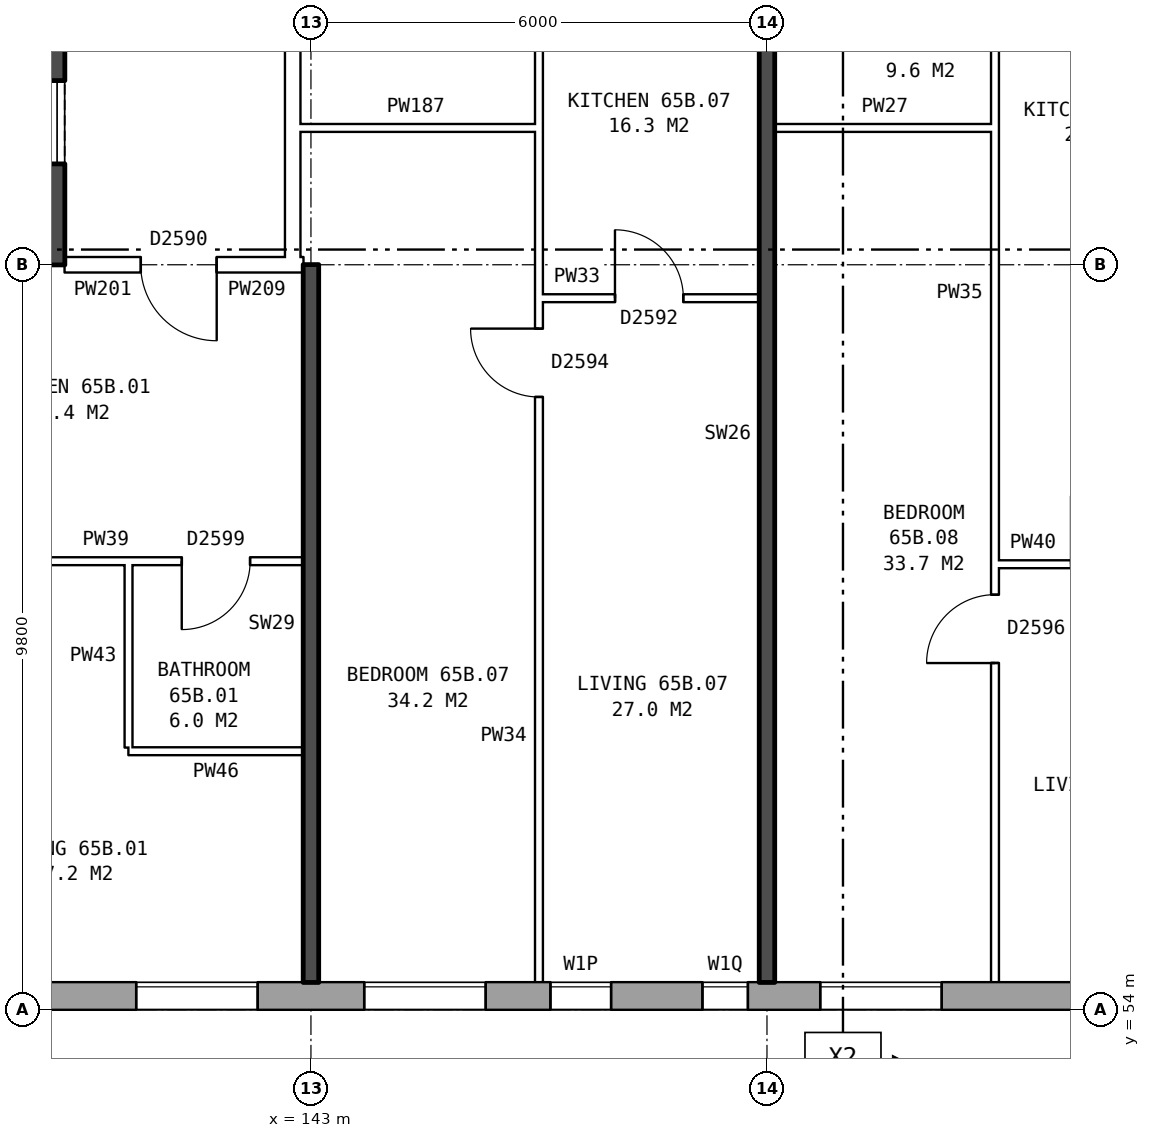
"""IFC4 building model, lengths in metres.
Left out: names, types, materials, properties, quantities, classifications, styles, units other than length and angle.
Written with IfcOpenShell. Run it as: python <this file> out.ifc"""

import sys

from ifc_helpers import new_model, si_unit, direction, frame, frame_2d, origin, place, context, subcontext, project, spatial, rectangle, extrude, element, fill, save


model = new_model("IFC4")
c1 = context("Model", 3, precision=1e-05, world=origin(), true_north=direction((0.0, 1.0)))
c2 = subcontext(c1, "Body", "Model", "MODEL_VIEW")
j1 = project(units=[si_unit("LENGTHUNIT", "METRE"), si_unit("PLANEANGLEUNIT", "RADIAN")], contexts=[c1])
p1 = place(None, origin())
s1 = spatial("IfcSite", under=j1, at=p1, CompositionType="ELEMENT")
p2 = place(p1, origin())
s2 = spatial("IfcBuilding", under=s1, at=p2, CompositionType="ELEMENT")
p3 = place(p2, frame((0.0, 0.0, 230.7)))
s3 = spatial("IfcBuildingStorey", under=s2, at=p3, CompositionType="ELEMENT", Elevation=230.7)
p4 = place(p3, frame((132.05, 54.18, 0.0), z_axis=(0.0, 0.0, 1.0), x_axis=(1.0, 0.0, 0.0)))
e1 = element("IfcWall", 1, at=p4, inside=s3, PredefinedType="STANDARD", context=c2, shape_type="SweptSolid", body=[
    extrude(rectangle(XDim=33.875, YDim=0.36, at=frame_2d((16.938, 0.0))), origin(), (0.0, 0.0, 1.0), 2.85),
])
p5 = place(p4, frame((2.65, 0.0, 0.8)))
e2 = element("IfcOpeningElement", 2, at=p5, cuts=e1, PredefinedType="OPENING", context=c2, shape_type="SweptSolid", body=[
    extrude(rectangle(XDim=1.6, YDim=1.8, at=frame_2d((0.8, 0.9))), frame((0.0, 0.19, 0.0), z_axis=(0.0, -1.0, 0.0), x_axis=(1.0, 0.0, 0.0)), (0.0, 0.0, 1.0), 0.38),
])
p6 = place(p4, frame((5.65, 0.0, 0.8)))
e3 = element("IfcOpeningElement", 3, at=p6, cuts=e1, PredefinedType="OPENING", context=c2, shape_type="SweptSolid", body=[
    extrude(rectangle(XDim=1.6, YDim=1.8, at=frame_2d((0.8, 0.9))), frame((0.0, 0.19, 0.0), z_axis=(0.0, -1.0, 0.0), x_axis=(1.0, 0.0, 0.0)), (0.0, 0.0, 1.0), 0.38),
])
p7 = place(p4, frame((8.65, 0.0, 0.8)))
e4 = element("IfcOpeningElement", 4, at=p7, cuts=e1, PredefinedType="OPENING", context=c2, shape_type="SweptSolid", body=[
    extrude(rectangle(XDim=1.6, YDim=1.8, at=frame_2d((0.8, 0.9))), frame((0.0, 0.19, 0.0), z_axis=(0.0, -1.0, 0.0), x_axis=(1.0, 0.0, 0.0)), (0.0, 0.0, 1.0), 0.38),
])
p8 = place(p4, frame((11.65, 0.0, 0.8)))
e5 = element("IfcOpeningElement", 5, at=p8, cuts=e1, PredefinedType="OPENING", context=c2, shape_type="SweptSolid", body=[
    extrude(rectangle(XDim=1.6, YDim=1.8, at=frame_2d((0.8, 0.9))), frame((0.0, 0.19, 0.0), z_axis=(0.0, -1.0, 0.0), x_axis=(1.0, 0.0, 0.0)), (0.0, 0.0, 1.0), 0.38),
])
p9 = place(p4, frame((14.1, 0.0, 1.25)))
e6 = element("IfcOpeningElement", 6, at=p9, cuts=e1, PredefinedType="OPENING", context=c2, shape_type="SweptSolid", body=[
    extrude(rectangle(XDim=0.8, YDim=1.2, at=frame_2d((0.4, 0.6))), frame((0.0, 0.19, 0.0), z_axis=(0.0, -1.0, 0.0), x_axis=(1.0, 0.0, 0.0)), (0.0, 0.0, 1.0), 0.38),
])
p10 = place(p4, frame((17.65, 0.0, 0.8)))
e7 = element("IfcOpeningElement", 7, at=p10, cuts=e1, PredefinedType="OPENING", context=c2, shape_type="SweptSolid", body=[
    extrude(rectangle(XDim=1.6, YDim=1.8, at=frame_2d((0.8, 0.9))), frame((0.0, 0.19, 0.0), z_axis=(0.0, -1.0, 0.0), x_axis=(1.0, 0.0, 0.0)), (0.0, 0.0, 1.0), 0.38),
])
p11 = place(p4, frame((21.25, 0.0, 0.8)))
e8 = element("IfcOpeningElement", 8, at=p11, cuts=e1, PredefinedType="OPENING", context=c2, shape_type="SweptSolid", body=[
    extrude(rectangle(XDim=1.4, YDim=1.8, at=frame_2d((0.7, 0.9))), frame((0.0, 0.19, 0.0), z_axis=(0.0, -1.0, 0.0), x_axis=(1.0, 0.0, 0.0)), (0.0, 0.0, 1.0), 0.38),
])
p12 = place(p4, frame((23.65, 0.0, 0.8)))
e9 = element("IfcOpeningElement", 9, at=p12, cuts=e1, PredefinedType="OPENING", context=c2, shape_type="SweptSolid", body=[
    extrude(rectangle(XDim=1.6, YDim=1.8, at=frame_2d((0.8, 0.9))), frame((0.0, 0.19, 0.0), z_axis=(0.0, -1.0, 0.0), x_axis=(1.0, 0.0, 0.0)), (0.0, 0.0, 1.0), 0.38),
])
p13 = place(p4, frame((26.65, 0.0, 0.8)))
e10 = element("IfcOpeningElement", 10, at=p13, cuts=e1, PredefinedType="OPENING", context=c2, shape_type="SweptSolid", body=[
    extrude(rectangle(XDim=1.6, YDim=1.8, at=frame_2d((0.8, 0.9))), frame((0.0, 0.19, 0.0), z_axis=(0.0, -1.0, 0.0), x_axis=(1.0, 0.0, 0.0)), (0.0, 0.0, 1.0), 0.38),
])
p14 = place(p4, frame((29.65, 0.0, 0.8)))
e11 = element("IfcOpeningElement", 11, at=p14, cuts=e1, PredefinedType="OPENING", context=c2, shape_type="SweptSolid", body=[
    extrude(rectangle(XDim=1.6, YDim=1.8, at=frame_2d((0.8, 0.9))), frame((0.0, 0.19, 0.0), z_axis=(0.0, -1.0, 0.0), x_axis=(1.0, 0.0, 0.0)), (0.0, 0.0, 1.0), 0.38),
])
p15 = place(p4, frame((16.1, 0.0, 0.15)))
e12 = element("IfcOpeningElement", 12, at=p15, cuts=e1, PredefinedType="OPENING", context=c2, shape_type="SweptSolid", body=[
    extrude(rectangle(XDim=0.6, YDim=1.2, at=frame_2d((0.3, 0.6))), frame((0.0, 0.19, 0.0), z_axis=(0.0, -1.0, 0.0), x_axis=(1.0, 0.0, 0.0)), (0.0, 0.0, 1.0), 0.38),
])
p16 = place(p3, frame((139.56, 63.8, 0.0), z_axis=(0.0, 0.0, 1.0), x_axis=(0.0, 1.0, 0.0)))
e13 = element("IfcWall", 13, at=p16, inside=s3, PredefinedType="SHEAR", context=c2, shape_type="SweptSolid", body=[
    extrude(rectangle(XDim=12.4, YDim=0.4, at=frame_2d((6.2, 0.0))), origin(), (0.0, 0.0, 1.0), 2.85),
])
p17 = place(p16, frame((1.325, 0.0, 0.0)))
e14 = element("IfcOpeningElement", 14, at=p17, cuts=e13, PredefinedType="OPENING", context=c2, shape_type="SweptSolid", body=[
    extrude(rectangle(XDim=1.1, YDim=2.1, at=frame_2d((0.55, 1.05))), frame((0.0, 0.21, 0.0), z_axis=(0.0, -1.0, 0.0), x_axis=(1.0, 0.0, 0.0)), (0.0, 0.0, 1.0), 0.42),
])
p18 = place(p16, frame((3.6, 0.0, 0.0)))
e15 = element("IfcOpeningElement", 15, at=p18, cuts=e13, PredefinedType="OPENING", context=c2, shape_type="SweptSolid", body=[
    extrude(rectangle(XDim=1.1, YDim=2.1, at=frame_2d((0.55, 1.05))), frame((0.0, 0.21, 0.0), z_axis=(0.0, -1.0, 0.0), x_axis=(1.0, 0.0, 0.0)), (0.0, 0.0, 1.0), 0.42),
])
p19 = place(p16, frame((5.8, 0.0, 0.0)))
e16 = element("IfcOpeningElement", 16, at=p19, cuts=e13, PredefinedType="OPENING", context=c2, shape_type="SweptSolid", body=[
    extrude(rectangle(XDim=1.1, YDim=2.1, at=frame_2d((0.55, 1.05))), frame((0.0, 0.21, 0.0), z_axis=(0.0, -1.0, 0.0), x_axis=(1.0, 0.0, 0.0)), (0.0, 0.0, 1.0), 0.42),
])
p20 = place(p16, frame((9.9, 0.0, 0.0)))
e17 = element("IfcOpeningElement", 17, at=p20, cuts=e13, PredefinedType="OPENING", context=c2, shape_type="SweptSolid", body=[
    extrude(rectangle(XDim=1.1, YDim=2.1, at=frame_2d((0.55, 1.05))), frame((0.0, 0.21, 0.0), z_axis=(0.0, -1.0, 0.0), x_axis=(1.0, 0.0, 0.0)), (0.0, 0.0, 1.0), 0.42),
])
p21 = place(p16, frame((8.125, 0.0, 0.0)))
e18 = element("IfcOpeningElement", 18, at=p21, cuts=e13, PredefinedType="OPENING", context=c2, shape_type="SweptSolid", body=[
    extrude(rectangle(XDim=0.85, YDim=2.1, at=frame_2d((0.425, 1.05))), frame((0.0, 0.21, 0.0), z_axis=(0.0, -1.0, 0.0), x_axis=(1.0, 0.0, 0.0)), (0.0, 0.0, 1.0), 0.42),
])
p22 = place(p3, frame((142.76, 63.9, 0.0), z_axis=(0.0, 0.0, 1.0), x_axis=(0.0, 1.0, 0.0)))
e19 = element("IfcWall", 19, at=p22, inside=s3, PredefinedType="PARTITIONING", context=c2, shape_type="SweptSolid", body=[
    extrude(rectangle(XDim=12.2, YDim=0.2, at=frame_2d((6.1, 0.0))), origin(), (0.0, 0.0, 1.0), 2.85),
])
p23 = place(p22, frame((5.1, 0.0, 0.0)))
e20 = element("IfcOpeningElement", 20, at=p23, cuts=e19, PredefinedType="OPENING", context=c2, shape_type="SweptSolid", body=[
    extrude(rectangle(XDim=2.0, YDim=2.1, at=frame_2d((1.0, 1.05))), frame((0.0, 0.11, 0.0), z_axis=(0.0, -1.0, 0.0), x_axis=(1.0, 0.0, 0.0)), (0.0, 0.0, 1.0), 0.22),
])
p24 = place(p3, frame((140.6, 57.4, 0.0), z_axis=(0.0, 0.0, 1.0), x_axis=(1.0, 0.0, 0.0)))
e21 = element("IfcWall", 21, at=p24, inside=s3, PredefinedType="PARTITIONING", context=c2, shape_type="SweptSolid", body=[
    extrude(rectangle(XDim=2.3, YDim=0.1, at=frame_2d((1.15, 0.0))), origin(), (0.0, 0.0, 1.0), 2.85),
])
p25 = place(p3, frame((152.0, 59.86, 0.0), z_axis=(0.0, 0.0, 1.0), x_axis=(1.0, 0.0, 0.0)))
e22 = element("IfcWall", 22, at=p25, inside=s3, PredefinedType="PARTITIONING", context=c2, shape_type="SweptSolid", body=[
    extrude(rectangle(XDim=2.9, YDim=0.1, at=frame_2d((1.45, 0.0))), origin(), (0.0, 0.0, 1.0), 2.85),
])
p26 = place(p25, frame((1.0, 0.0, 0.0)))
e23 = element("IfcOpeningElement", 23, at=p26, cuts=e22, PredefinedType="OPENING", context=c2, shape_type="SweptSolid", body=[
    extrude(rectangle(XDim=0.9, YDim=2.1, at=frame_2d((0.45, 1.05))), frame((0.0, 0.06, 0.0), z_axis=(0.0, -1.0, 0.0), x_axis=(1.0, 0.0, 0.0)), (0.0, 0.0, 1.0), 0.12),
])
p27 = place(p3, frame((137.1, 59.9, 0.0), z_axis=(0.0, 0.0, 1.0), x_axis=(1.0, 0.0, 0.0)))
e24 = element("IfcWall", 24, at=p27, inside=s3, PredefinedType="PARTITIONING", context=c2, shape_type="SweptSolid", body=[
    extrude(rectangle(XDim=5.8, YDim=0.1, at=frame_2d((2.9, 0.0))), origin(), (0.0, 0.0, 1.0), 2.85),
])
p28 = place(p27, frame((1.3, 0.0, 0.0)))
e25 = element("IfcOpeningElement", 25, at=p28, cuts=e24, PredefinedType="OPENING", context=c2, shape_type="SweptSolid", body=[
    extrude(rectangle(XDim=0.9, YDim=2.1, at=frame_2d((0.45, 1.05))), frame((0.0, 0.06, 0.0), z_axis=(0.0, -1.0, 0.0), x_axis=(1.0, 0.0, 0.0)), (0.0, 0.0, 1.0), 0.12),
])
p29 = place(p27, frame((4.2, 0.0, 0.0)))
e26 = element("IfcOpeningElement", 26, at=p29, cuts=e24, PredefinedType="OPENING", context=c2, shape_type="SweptSolid", body=[
    extrude(rectangle(XDim=0.9, YDim=2.1, at=frame_2d((0.45, 1.05))), frame((0.0, 0.06, 0.0), z_axis=(0.0, -1.0, 0.0), x_axis=(1.0, 0.0, 0.0)), (0.0, 0.0, 1.0), 0.12),
])
p30 = place(p3, frame((146.0, 63.36, 0.0), z_axis=(0.0, 0.0, 1.0), x_axis=(1.0, 0.0, 0.0)))
e27 = element("IfcWall", 27, at=p30, inside=s3, PredefinedType="PARTITIONING", context=c2, shape_type="SweptSolid", body=[
    extrude(rectangle(XDim=2.9, YDim=0.1, at=frame_2d((1.45, 0.0))), origin(), (0.0, 0.0, 1.0), 2.85),
])
p31 = place(p30, frame((1.0, 0.0, 0.0)))
e28 = element("IfcOpeningElement", 28, at=p31, cuts=e27, PredefinedType="OPENING", context=c2, shape_type="SweptSolid", body=[
    extrude(rectangle(XDim=0.9, YDim=2.1, at=frame_2d((0.45, 1.05))), frame((0.0, 0.06, 0.0), z_axis=(0.0, -1.0, 0.0), x_axis=(1.0, 0.0, 0.0)), (0.0, 0.0, 1.0), 0.12),
])
p32 = place(p3, frame((139.76, 63.8, 0.0), z_axis=(0.0, 0.0, 1.0), x_axis=(1.0, 0.0, 0.0)))
e29 = element("IfcWall", 29, at=p32, inside=s3, PredefinedType="PARTITIONING", context=c2, shape_type="SweptSolid", body=[
    extrude(rectangle(XDim=3.0, YDim=0.2, at=frame_2d((1.5, 0.0))), origin(), (0.0, 0.0, 1.0), 2.85),
])
p33 = place(p32, frame((1.0, 0.0, 0.0)))
e30 = element("IfcOpeningElement", 30, at=p33, cuts=e29, PredefinedType="OPENING", context=c2, shape_type="SweptSolid", body=[
    extrude(rectangle(XDim=1.0, YDim=2.1, at=frame_2d((0.5, 1.05))), frame((0.0, 0.11, 0.0), z_axis=(0.0, -1.0, 0.0), x_axis=(1.0, 0.0, 0.0)), (0.0, 0.0, 1.0), 0.22),
])
p34 = place(p3, frame((142.76, 63.8, 0.0), z_axis=(0.0, 0.0, 1.0), x_axis=(1.0, 0.0, 0.0)))
e31 = element("IfcWall", 31, at=p34, inside=s3, PredefinedType="PARTITIONING", context=c2, shape_type="SweptSolid", body=[
    extrude(rectangle(XDim=0.14, YDim=0.2, at=frame_2d((0.07, 0.0))), origin(), (0.0, 0.0, 1.0), 2.85),
])
p35 = place(p3, frame((142.76, 65.6, 0.0), z_axis=(0.0, 0.0, 1.0), x_axis=(1.0, 0.0, 0.0)))
e32 = element("IfcWall", 32, at=p35, inside=s3, PredefinedType="PARTITIONING", context=c2, shape_type="SweptSolid", body=[
    extrude(rectangle(XDim=3.24, YDim=0.1, at=frame_2d((1.62, 0.0))), origin(), (0.0, 0.0, 1.0), 2.85),
])
p36 = place(p3, frame((149.1, 65.6, 0.0), z_axis=(0.0, 0.0, 1.0), x_axis=(1.0, 0.0, 0.0)))
e33 = element("IfcWall", 33, at=p36, inside=s3, PredefinedType="PARTITIONING", context=c2, shape_type="SweptSolid", body=[
    extrude(rectangle(XDim=2.9, YDim=0.1, at=frame_2d((1.45, 0.0))), origin(), (0.0, 0.0, 1.0), 2.85),
])
p37 = place(p3, frame((140.6, 57.45, 0.0), z_axis=(0.0, 0.0, 1.0), x_axis=(0.0, 1.0, 0.0)))
e34 = element("IfcWall", 34, at=p37, inside=s3, PredefinedType="PARTITIONING", context=c2, shape_type="SweptSolid", body=[
    extrude(rectangle(XDim=2.4, YDim=0.1, at=frame_2d((1.2, 0.0))), origin(), (0.0, 0.0, 1.0), 2.85),
])
p38 = place(p3, frame((143.0, 54.36, 0.0), z_axis=(0.0, 0.0, 1.0), x_axis=(0.0, 1.0, 0.0)))
e35 = element("IfcWall", 35, at=p38, inside=s3, PredefinedType="SOLIDWALL", context=c2, shape_type="SweptSolid", body=[
    extrude(rectangle(XDim=9.44, YDim=0.2, at=frame_2d((4.72, 0.0))), origin(), (0.0, 0.0, 1.0), 2.85),
])
p39 = place(p3, frame((146.0, 54.36, 0.0), z_axis=(0.0, 0.0, 1.0), x_axis=(0.0, 1.0, 0.0)))
e36 = element("IfcWall", 36, at=p39, inside=s3, PredefinedType="PARTITIONING", context=c2, shape_type="SweptSolid", body=[
    extrude(rectangle(XDim=14.34, YDim=0.1, at=frame_2d((7.17, 0.0))), origin(), (0.0, 0.0, 1.0), 2.85),
])
p40 = place(p39, frame((7.7, 0.0, 0.0)))
e37 = element("IfcOpeningElement", 37, at=p40, cuts=e36, PredefinedType="OPENING", context=c2, shape_type="SweptSolid", body=[
    extrude(rectangle(XDim=0.9, YDim=2.1, at=frame_2d((0.45, 1.05))), frame((0.0, 0.06, 0.0), z_axis=(0.0, -1.0, 0.0), x_axis=(1.0, 0.0, 0.0)), (0.0, 0.0, 1.0), 0.12),
])
p41 = place(p39, frame((13.04, 0.0, 0.0)))
e38 = element("IfcOpeningElement", 38, at=p41, cuts=e36, PredefinedType="OPENING", context=c2, shape_type="SweptSolid", body=[
    extrude(rectangle(XDim=0.9, YDim=2.1, at=frame_2d((0.45, 1.05))), frame((0.0, 0.06, 0.0), z_axis=(0.0, -1.0, 0.0), x_axis=(1.0, 0.0, 0.0)), (0.0, 0.0, 1.0), 0.12),
])
p42 = place(p3, frame((149.0, 54.36, 0.0), z_axis=(0.0, 0.0, 1.0), x_axis=(0.0, 1.0, 0.0)))
e39 = element("IfcWall", 39, at=p42, inside=s3, PredefinedType="SOLIDWALL", context=c2, shape_type="SweptSolid", body=[
    extrude(rectangle(XDim=14.44, YDim=0.2, at=frame_2d((7.22, 0.0))), origin(), (0.0, 0.0, 1.0), 2.85),
])
p43 = place(p3, frame((152.0, 54.36, 0.0), z_axis=(0.0, 0.0, 1.0), x_axis=(0.0, 1.0, 0.0)))
e40 = element("IfcWall", 40, at=p43, inside=s3, PredefinedType="PARTITIONING", context=c2, shape_type="SweptSolid", body=[
    extrude(rectangle(XDim=14.34, YDim=0.1, at=frame_2d((7.17, 0.0))), origin(), (0.0, 0.0, 1.0), 2.85),
])
p44 = place(p43, frame((4.2, 0.0, 0.0)))
e41 = element("IfcOpeningElement", 41, at=p44, cuts=e40, PredefinedType="OPENING", context=c2, shape_type="SweptSolid", body=[
    extrude(rectangle(XDim=0.9, YDim=2.1, at=frame_2d((0.45, 1.05))), frame((0.0, 0.06, 0.0), z_axis=(0.0, -1.0, 0.0), x_axis=(1.0, 0.0, 0.0)), (0.0, 0.0, 1.0), 0.12),
])
p45 = place(p43, frame((13.04, 0.0, 0.0)))
e42 = element("IfcOpeningElement", 42, at=p45, cuts=e40, PredefinedType="OPENING", context=c2, shape_type="SweptSolid", body=[
    extrude(rectangle(XDim=0.9, YDim=2.1, at=frame_2d((0.45, 1.05))), frame((0.0, 0.06, 0.0), z_axis=(0.0, -1.0, 0.0), x_axis=(1.0, 0.0, 0.0)), (0.0, 0.0, 1.0), 0.12),
])
p46 = place(p7, origin())
e43 = element("IfcWindow", 43, at=p46, inside=s3, PartitioningType="SINGLE_PANEL", PredefinedType="WINDOW", context=c2, shape_type="SweptSolid", body=[
    extrude(rectangle(XDim=1.6, YDim=1.8, at=frame_2d((0.8, 0.9))), frame((0.0, 0.15, 0.0), z_axis=(0.0, -1.0, 0.0), x_axis=(1.0, 0.0, 0.0)), (0.0, 0.0, 1.0), 0.06),
])
fill(e4, e43)
p47 = place(p8, origin())
e44 = element("IfcWindow", 44, at=p47, inside=s3, PartitioningType="SINGLE_PANEL", PredefinedType="WINDOW", context=c2, shape_type="SweptSolid", body=[
    extrude(rectangle(XDim=1.6, YDim=1.8, at=frame_2d((0.8, 0.9))), frame((0.0, 0.15, 0.0), z_axis=(0.0, -1.0, 0.0), x_axis=(1.0, 0.0, 0.0)), (0.0, 0.0, 1.0), 0.06),
])
fill(e5, e44)
p48 = place(p9, origin())
e45 = element("IfcWindow", 45, at=p48, inside=s3, PartitioningType="SINGLE_PANEL", PredefinedType="WINDOW", context=c2, shape_type="SweptSolid", body=[
    extrude(rectangle(XDim=0.8, YDim=1.2, at=frame_2d((0.4, 0.6))), frame((0.0, 0.15, 0.0), z_axis=(0.0, -1.0, 0.0), x_axis=(1.0, 0.0, 0.0)), (0.0, 0.0, 1.0), 0.06),
])
fill(e6, e45)
p49 = place(p10, origin())
e46 = element("IfcWindow", 46, at=p49, inside=s3, PartitioningType="SINGLE_PANEL", PredefinedType="WINDOW", context=c2, shape_type="SweptSolid", body=[
    extrude(rectangle(XDim=1.6, YDim=1.8, at=frame_2d((0.8, 0.9))), frame((0.0, 0.15, 0.0), z_axis=(0.0, -1.0, 0.0), x_axis=(1.0, 0.0, 0.0)), (0.0, 0.0, 1.0), 0.06),
])
fill(e7, e46)
p50 = place(p33, frame((1.0, 0.0, 0.0), z_axis=(0.0, 0.0, 1.0), x_axis=(-1.0, 0.0, 0.0)))
e47 = element("IfcDoor", 47, at=p50, inside=s3, OperationType="SINGLE_SWING_LEFT", PredefinedType="DOOR", context=c2, shape_type="SweptSolid", body=[
    extrude(rectangle(XDim=1.0, YDim=2.1, at=frame_2d((0.5, 1.05))), frame((0.0, 0.025, 0.0), z_axis=(0.0, -1.0, 0.0), x_axis=(1.0, 0.0, 0.0)), (0.0, 0.0, 1.0), 0.05),
])
fill(e30, e47)
p51 = place(p29, frame((0.9, 0.0, 0.0), z_axis=(0.0, 0.0, 1.0), x_axis=(-1.0, 0.0, 0.0)))
e48 = element("IfcDoor", 48, at=p51, inside=s3, OperationType="SINGLE_SWING_RIGHT", PredefinedType="DOOR", context=c2, shape_type="SweptSolid", body=[
    extrude(rectangle(XDim=0.9, YDim=2.1, at=frame_2d((0.45, 1.05))), frame((0.0, 0.025, 0.0), z_axis=(0.0, -1.0, 0.0), x_axis=(1.0, 0.0, 0.0)), (0.0, 0.0, 1.0), 0.05),
])
fill(e26, e48)
p52 = place(p40, origin())
e49 = element("IfcDoor", 49, at=p52, inside=s3, OperationType="SINGLE_SWING_RIGHT", PredefinedType="DOOR", context=c2, shape_type="SweptSolid", body=[
    extrude(rectangle(XDim=0.9, YDim=2.1, at=frame_2d((0.45, 1.05))), frame((0.0, 0.025, 0.0), z_axis=(0.0, -1.0, 0.0), x_axis=(1.0, 0.0, 0.0)), (0.0, 0.0, 1.0), 0.05),
])
fill(e37, e49)
p53 = place(p31, origin())
e50 = element("IfcDoor", 50, at=p53, inside=s3, OperationType="SINGLE_SWING_LEFT", PredefinedType="DOOR", context=c2, shape_type="SweptSolid", body=[
    extrude(rectangle(XDim=0.9, YDim=2.1, at=frame_2d((0.45, 1.05))), frame((0.0, 0.025, 0.0), z_axis=(0.0, -1.0, 0.0), x_axis=(1.0, 0.0, 0.0)), (0.0, 0.0, 1.0), 0.05),
])
fill(e28, e50)
p54 = place(p44, origin())
e51 = element("IfcDoor", 51, at=p54, inside=s3, OperationType="SINGLE_SWING_LEFT", PredefinedType="DOOR", context=c2, shape_type="SweptSolid", body=[
    extrude(rectangle(XDim=0.9, YDim=2.1, at=frame_2d((0.45, 1.05))), frame((0.0, 0.025, 0.0), z_axis=(0.0, -1.0, 0.0), x_axis=(1.0, 0.0, 0.0)), (0.0, 0.0, 1.0), 0.05),
])
fill(e41, e51)
p55 = place(p15, origin())
e52 = element("IfcWindow", 52, at=p55, inside=s3, PartitioningType="SINGLE_PANEL", PredefinedType="WINDOW", context=c2, shape_type="SweptSolid", body=[
    extrude(rectangle(XDim=0.6, YDim=1.2, at=frame_2d((0.3, 0.6))), frame((0.0, 0.15, 0.0), z_axis=(0.0, -1.0, 0.0), x_axis=(1.0, 0.0, 0.0)), (0.0, 0.0, 1.0), 0.06),
])
fill(e12, e52)
save(model, sys.argv[1])
